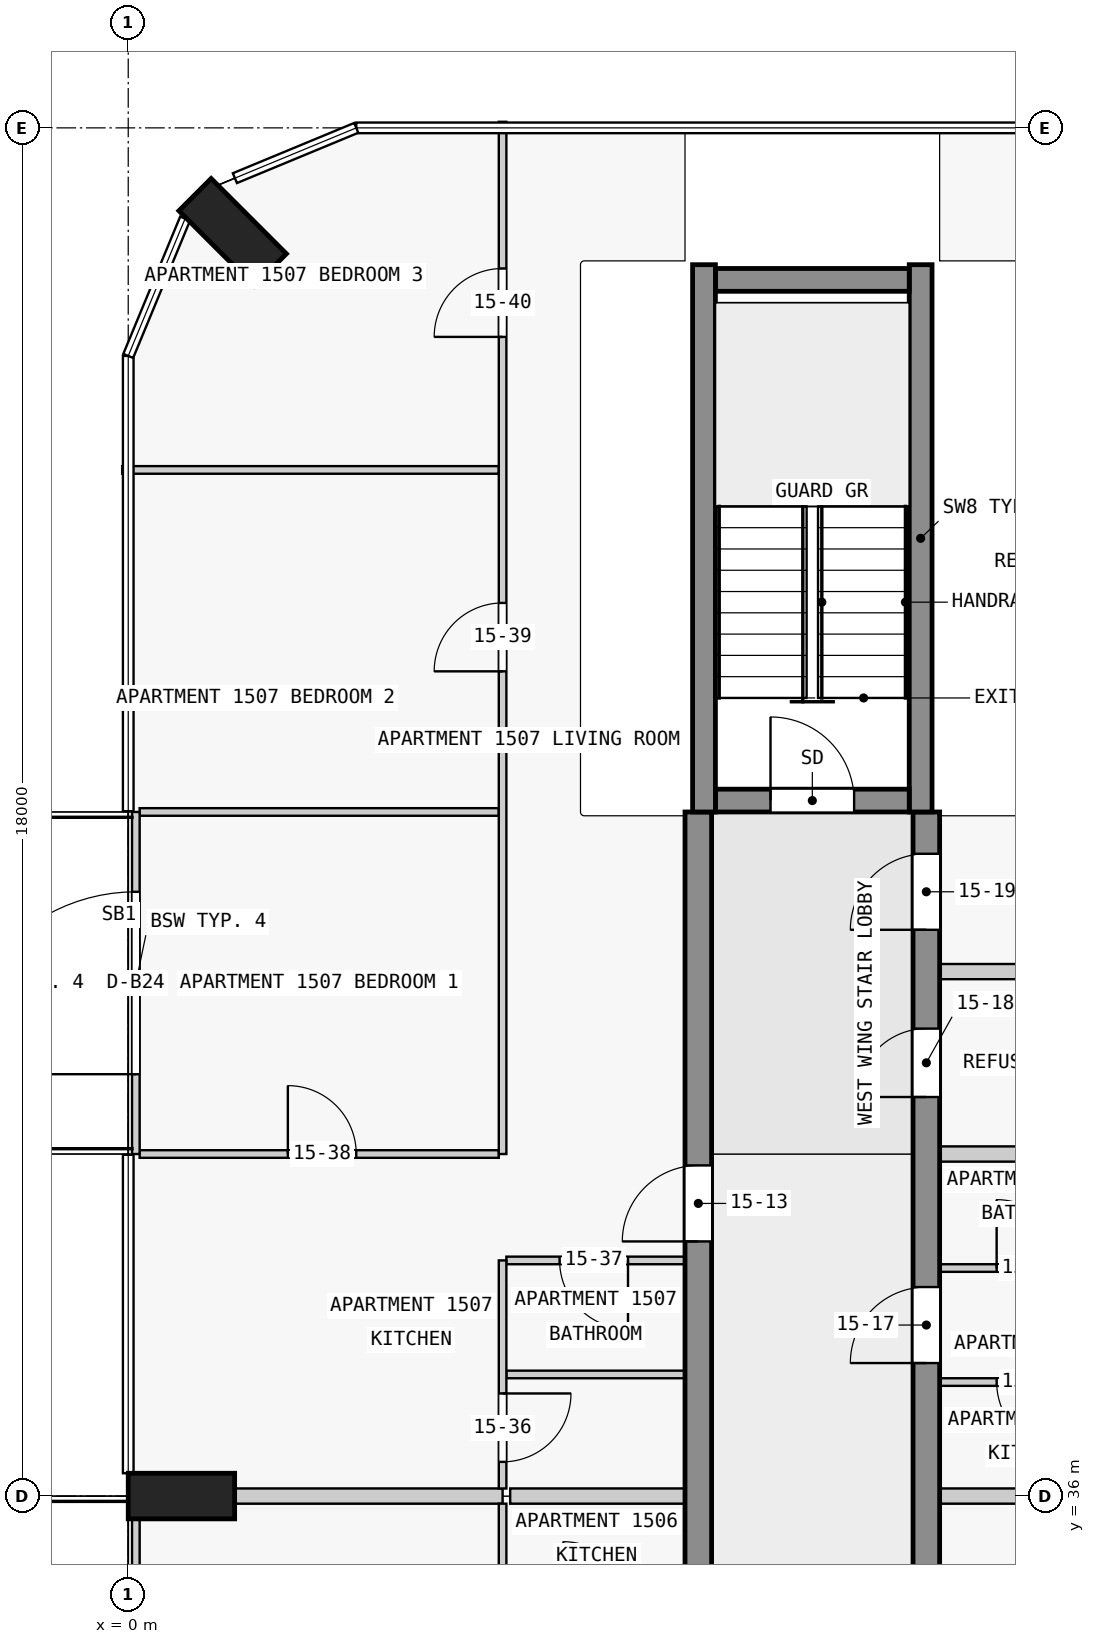
"""IFC4 building model, lengths in metres.
Left out: names, types, materials, properties, quantities, classifications, styles, units other than length and angle.
Written with IfcOpenShell. Run it as: python <this file> out.ifc"""

import sys

from ifc_helpers import new_model, si_unit, direction, frame, frame_2d, origin, origin_2d, place, context, subcontext, project, spatial, rectangle, extrude, element, fill, save


model = new_model("IFC4")
c1 = context("Model", 3, precision=1e-05, world=origin(), true_north=direction((0.0, 1.0)))
c2 = subcontext(c1, "Body", "Model", "MODEL_VIEW")
j1 = project(units=[si_unit("LENGTHUNIT", "METRE"), si_unit("PLANEANGLEUNIT", "RADIAN")], contexts=[c1])
p1 = place(None, origin())
s1 = spatial("IfcSite", under=j1, at=p1, CompositionType="ELEMENT")
p2 = place(p1, origin())
s2 = spatial("IfcBuilding", under=s1, at=p2, CompositionType="ELEMENT")
p3 = place(p2, frame((0.0, 0.0, 61.8)))
s3 = spatial("IfcBuildingStorey", under=s2, at=p3, CompositionType="ELEMENT", Elevation=61.8)
for number, where, z_axis, x_axis in (
    (1, (1.374, 52.626, 0.0), (0.0, 0.0, 1.0), (0.707, 0.707, 0.0)),
    (2, (0.7, 36.0, 0.0), (0.0, 0.0, 1.0), (0.0, 1.0, 0.0)),
):
    element("IfcColumn", number, at=place(p3, frame(where, z_axis=z_axis, x_axis=x_axis)), inside=s3, PredefinedType="COLUMN", context=c2, shape_type="SweptSolid", body=[
        extrude(rectangle(XDim=0.6, YDim=1.4, at=origin_2d()), origin(), (0.0, 0.0, 1.0), 3.5),
    ])
p4 = place(p3, frame((7.725, 45.15, 0.0), z_axis=(0.0, 0.0, 1.0), x_axis=(1.0, 0.0, 0.0)))
e3 = element("IfcWall", 3, at=p4, inside=s3, PredefinedType="SHEAR", context=c2, shape_type="SweptSolid", body=[
    extrude(rectangle(XDim=2.55, YDim=0.3, at=frame_2d((1.275, 0.0))), origin(), (0.0, 0.0, 1.0), 3.5),
])
p5 = place(p4, frame((0.725, 0.0, 0.0)))
e4 = element("IfcOpeningElement", 4, at=p5, cuts=e3, PredefinedType="OPENING", context=c2, shape_type="SweptSolid", body=[
    extrude(rectangle(XDim=1.1, YDim=2.1, at=frame_2d((0.55, 1.05))), frame((0.0, 0.16, 0.0), z_axis=(0.0, -1.0, 0.0), x_axis=(1.0, 0.0, 0.0)), (0.0, 0.0, 1.0), 0.32),
])
p6 = place(p3, frame((7.725, 52.0, 0.0), z_axis=(0.0, 0.0, 1.0), x_axis=(1.0, 0.0, 0.0)))
e5 = element("IfcWall", 5, at=p6, inside=s3, PredefinedType="SHEAR", context=c2, shape_type="SweptSolid", body=[
    extrude(rectangle(XDim=2.55, YDim=0.3, at=frame_2d((1.275, 0.0))), origin(), (0.0, 0.0, 1.0), 3.5),
])
for number, where, z_axis, x_axis in (
    (6, (7.575, 45.0, 0.0), (0.0, 0.0, 1.0), (0.0, 1.0, 0.0)),
    (7, (10.425, 45.0, 0.0), (0.0, 0.0, 1.0), (0.0, 1.0, 0.0)),
):
    element("IfcWall", number, at=place(p3, frame(where, z_axis=z_axis, x_axis=x_axis)), inside=s3, PredefinedType="SHEAR", context=c2, shape_type="SweptSolid", body=[
        extrude(rectangle(XDim=7.2, YDim=0.3, at=frame_2d((3.6, 0.0))), origin(), (0.0, 0.0, 1.0), 3.5),
    ])
p7 = place(p3, frame((7.5, 18.0, 0.0), z_axis=(0.0, 0.0, 1.0), x_axis=(0.0, 1.0, 0.0)))
e8 = element("IfcWall", 8, at=p7, inside=s3, PredefinedType="SHEAR", context=c2, shape_type="SweptSolid", body=[
    extrude(rectangle(XDim=27.0, YDim=0.35, at=frame_2d((13.5, 0.0))), origin(), (0.0, 0.0, 1.0), 3.25),
])
p8 = place(p7, frame((1.75, 0.0, 0.0)))
e9 = element("IfcOpeningElement", 9, at=p8, cuts=e8, PredefinedType="OPENING", context=c2, shape_type="SweptSolid", body=[
    extrude(rectangle(XDim=1.0, YDim=2.1, at=frame_2d((0.5, 1.05))), frame((0.0, 0.185, 0.0), z_axis=(0.0, -1.0, 0.0), x_axis=(1.0, 0.0, 0.0)), (0.0, 0.0, 1.0), 0.37),
])
p9 = place(p7, frame((8.55, 0.0, 0.0)))
e10 = element("IfcOpeningElement", 10, at=p9, cuts=e8, PredefinedType="OPENING", context=c2, shape_type="SweptSolid", body=[
    extrude(rectangle(XDim=1.0, YDim=2.1, at=frame_2d((0.5, 1.05))), frame((0.0, 0.185, 0.0), z_axis=(0.0, -1.0, 0.0), x_axis=(1.0, 0.0, 0.0)), (0.0, 0.0, 1.0), 0.37),
])
p10 = place(p7, frame((15.25, 0.0, 0.0)))
e11 = element("IfcOpeningElement", 11, at=p10, cuts=e8, PredefinedType="OPENING", context=c2, shape_type="SweptSolid", body=[
    extrude(rectangle(XDim=1.0, YDim=2.1, at=frame_2d((0.5, 1.05))), frame((0.0, 0.185, 0.0), z_axis=(0.0, -1.0, 0.0), x_axis=(1.0, 0.0, 0.0)), (0.0, 0.0, 1.0), 0.37),
])
p11 = place(p7, frame((21.35, 0.0, 0.0)))
e12 = element("IfcOpeningElement", 12, at=p11, cuts=e8, PredefinedType="OPENING", context=c2, shape_type="SweptSolid", body=[
    extrude(rectangle(XDim=1.0, YDim=2.1, at=frame_2d((0.5, 1.05))), frame((0.0, 0.185, 0.0), z_axis=(0.0, -1.0, 0.0), x_axis=(1.0, 0.0, 0.0)), (0.0, 0.0, 1.0), 0.37),
])
p12 = place(p3, frame((10.5, 18.0, 0.0), z_axis=(0.0, 0.0, 1.0), x_axis=(0.0, 1.0, 0.0)))
e13 = element("IfcWall", 13, at=p12, inside=s3, PredefinedType="SHEAR", context=c2, shape_type="SweptSolid", body=[
    extrude(rectangle(XDim=27.0, YDim=0.35, at=frame_2d((13.5, 0.0))), origin(), (0.0, 0.0, 1.0), 3.25),
])
p13 = place(p12, frame((4.05, 0.0, 0.0)))
e14 = element("IfcOpeningElement", 14, at=p13, cuts=e13, PredefinedType="OPENING", context=c2, shape_type="SweptSolid", body=[
    extrude(rectangle(XDim=1.0, YDim=2.1, at=frame_2d((0.5, 1.05))), frame((0.0, 0.185, 0.0), z_axis=(0.0, -1.0, 0.0), x_axis=(1.0, 0.0, 0.0)), (0.0, 0.0, 1.0), 0.37),
])
p14 = place(p12, frame((10.75, 0.0, 0.0)))
e15 = element("IfcOpeningElement", 15, at=p14, cuts=e13, PredefinedType="OPENING", context=c2, shape_type="SweptSolid", body=[
    extrude(rectangle(XDim=1.0, YDim=2.1, at=frame_2d((0.5, 1.05))), frame((0.0, 0.185, 0.0), z_axis=(0.0, -1.0, 0.0), x_axis=(1.0, 0.0, 0.0)), (0.0, 0.0, 1.0), 0.37),
])
p15 = place(p12, frame((15.25, 0.0, 0.0)))
e16 = element("IfcOpeningElement", 16, at=p15, cuts=e13, PredefinedType="OPENING", context=c2, shape_type="SweptSolid", body=[
    extrude(rectangle(XDim=1.0, YDim=2.1, at=frame_2d((0.5, 1.05))), frame((0.0, 0.185, 0.0), z_axis=(0.0, -1.0, 0.0), x_axis=(1.0, 0.0, 0.0)), (0.0, 0.0, 1.0), 0.37),
])
p16 = place(p12, frame((19.75, 0.0, 0.0)))
e17 = element("IfcOpeningElement", 17, at=p16, cuts=e13, PredefinedType="OPENING", context=c2, shape_type="SweptSolid", body=[
    extrude(rectangle(XDim=1.0, YDim=2.1, at=frame_2d((0.5, 1.05))), frame((0.0, 0.185, 0.0), z_axis=(0.0, -1.0, 0.0), x_axis=(1.0, 0.0, 0.0)), (0.0, 0.0, 1.0), 0.37),
])
p17 = place(p12, frame((23.25, 0.0, 0.0)))
e18 = element("IfcOpeningElement", 18, at=p17, cuts=e13, PredefinedType="OPENING", context=c2, shape_type="SweptSolid", body=[
    extrude(rectangle(XDim=0.9, YDim=2.1, at=frame_2d((0.45, 1.05))), frame((0.0, 0.185, 0.0), z_axis=(0.0, -1.0, 0.0), x_axis=(1.0, 0.0, 0.0)), (0.0, 0.0, 1.0), 0.37),
])
p18 = place(p12, frame((25.45, 0.0, 0.0)))
e19 = element("IfcOpeningElement", 19, at=p18, cuts=e13, PredefinedType="OPENING", context=c2, shape_type="SweptSolid", body=[
    extrude(rectangle(XDim=1.0, YDim=2.1, at=frame_2d((0.5, 1.05))), frame((0.0, 0.185, 0.0), z_axis=(0.0, -1.0, 0.0), x_axis=(1.0, 0.0, 0.0)), (0.0, 0.0, 1.0), 0.37),
])
p19 = place(p3, frame((0.1, 31.5, 0.0), z_axis=(0.0, 0.0, 1.0), x_axis=(0.0, 1.0, 0.0)))
e20 = element("IfcWall", 20, at=p19, inside=s3, PredefinedType="STANDARD", context=c2, shape_type="SweptSolid", body=[
    extrude(rectangle(XDim=4.5, YDim=0.1, at=frame_2d((2.25, 0.0))), origin(), (0.0, 0.0, 1.0), 3.25),
])
p20 = place(p19, frame((1.05, 0.0, 0.0)))
e21 = element("IfcOpeningElement", 21, at=p20, cuts=e20, PredefinedType="OPENING", context=c2, shape_type="SweptSolid", body=[
    extrude(rectangle(XDim=2.4, YDim=2.4, at=frame_2d((1.2, 1.2))), frame((0.0, 0.06, 0.0), z_axis=(0.0, -1.0, 0.0), x_axis=(1.0, 0.0, 0.0)), (0.0, 0.0, 1.0), 0.12),
])
p21 = place(p3, frame((0.1, 40.5, 0.0), z_axis=(0.0, 0.0, 1.0), x_axis=(0.0, 1.0, 0.0)))
e22 = element("IfcWall", 22, at=p21, inside=s3, PredefinedType="STANDARD", context=c2, shape_type="SweptSolid", body=[
    extrude(rectangle(XDim=4.5, YDim=0.1, at=frame_2d((2.25, 0.0))), origin(), (0.0, 0.0, 1.0), 3.25),
])
p22 = place(p21, frame((1.05, 0.0, 0.0)))
e23 = element("IfcOpeningElement", 23, at=p22, cuts=e22, PredefinedType="OPENING", context=c2, shape_type="SweptSolid", body=[
    extrude(rectangle(XDim=2.4, YDim=2.4, at=frame_2d((1.2, 1.2))), frame((0.0, 0.06, 0.0), z_axis=(0.0, -1.0, 0.0), x_axis=(1.0, 0.0, 0.0)), (0.0, 0.0, 1.0), 0.12),
])
p23 = place(p3, frame((7.325, 36.0, 0.0), z_axis=(0.0, 0.0, 1.0), x_axis=(-1.0, 0.0, 0.0)))
e24 = element("IfcWall", 24, at=p23, inside=s3, PredefinedType="PARTITIONING", context=c2, shape_type="SweptSolid", body=[
    extrude(rectangle(XDim=2.3, YDim=0.2, at=frame_2d((1.15, 0.0))), origin(), (0.0, 0.0, 1.0), 3.25),
])
p24 = place(p3, frame((16.6, 36.0, 0.0), z_axis=(0.0, 0.0, 1.0), x_axis=(-1.0, 0.0, 0.0)))
e25 = element("IfcWall", 25, at=p24, inside=s3, PredefinedType="PARTITIONING", context=c2, shape_type="SweptSolid", body=[
    extrude(rectangle(XDim=5.925, YDim=0.2, at=frame_2d((2.962, 0.0))), origin(), (0.0, 0.0, 1.0), 3.25),
])
p25 = place(p3, frame((1.4, 36.0, 0.0), z_axis=(0.0, 0.0, 1.0), x_axis=(1.0, 0.0, 0.0)))
e26 = element("IfcWall", 26, at=p25, inside=s3, PredefinedType="PARTITIONING", context=c2, shape_type="SweptSolid", body=[
    extrude(rectangle(XDim=3.525, YDim=0.2, at=frame_2d((1.763, 0.0))), origin(), (0.0, 0.0, 1.0), 3.25),
])
p26 = place(p3, frame((13.075, 37.5, 0.0), z_axis=(0.0, 0.0, 1.0), x_axis=(-1.0, 0.0, 0.0)))
e27 = element("IfcWall", 27, at=p26, inside=s3, PredefinedType="PARTITIONING", context=c2, shape_type="SweptSolid", body=[
    extrude(rectangle(XDim=2.4, YDim=0.1, at=frame_2d((1.2, 0.0))), origin(), (0.0, 0.0, 1.0), 3.25),
])
p27 = place(p26, frame((0.75, 0.0, 0.0)))
e28 = element("IfcOpeningElement", 28, at=p27, cuts=e27, PredefinedType="OPENING", context=c2, shape_type="SweptSolid", body=[
    extrude(rectangle(XDim=0.9, YDim=2.1, at=frame_2d((0.45, 1.05))), frame((0.0, 0.06, 0.0), z_axis=(0.0, -1.0, 0.0), x_axis=(1.0, 0.0, 0.0)), (0.0, 0.0, 1.0), 0.12),
])
p28 = place(p3, frame((7.325, 37.6, 0.0), z_axis=(0.0, 0.0, 1.0), x_axis=(-1.0, 0.0, 0.0)))
e29 = element("IfcWall", 29, at=p28, inside=s3, PredefinedType="PARTITIONING", context=c2, shape_type="SweptSolid", body=[
    extrude(rectangle(XDim=2.35, YDim=0.1, at=frame_2d((1.175, 0.0))), origin(), (0.0, 0.0, 1.0), 3.25),
])
p29 = place(p3, frame((10.675, 39.0, 0.0), z_axis=(0.0, 0.0, 1.0), x_axis=(1.0, 0.0, 0.0)))
e30 = element("IfcWall", 30, at=p29, inside=s3, PredefinedType="PARTITIONING", context=c2, shape_type="SweptSolid", body=[
    extrude(rectangle(XDim=2.4, YDim=0.1, at=frame_2d((1.2, 0.0))), origin(), (0.0, 0.0, 1.0), 3.25),
])
p30 = place(p29, frame((0.75, 0.0, 0.0)))
e31 = element("IfcOpeningElement", 31, at=p30, cuts=e30, PredefinedType="OPENING", context=c2, shape_type="SweptSolid", body=[
    extrude(rectangle(XDim=0.9, YDim=2.1, at=frame_2d((0.45, 1.05))), frame((0.0, 0.06, 0.0), z_axis=(0.0, -1.0, 0.0), x_axis=(1.0, 0.0, 0.0)), (0.0, 0.0, 1.0), 0.12),
])
p31 = place(p3, frame((7.325, 39.1, 0.0), z_axis=(0.0, 0.0, 1.0), x_axis=(-1.0, 0.0, 0.0)))
e32 = element("IfcWall", 32, at=p31, inside=s3, PredefinedType="PARTITIONING", context=c2, shape_type="SweptSolid", body=[
    extrude(rectangle(XDim=2.35, YDim=0.1, at=frame_2d((1.175, 0.0))), origin(), (0.0, 0.0, 1.0), 3.25),
])
p32 = place(p31, frame((0.75, 0.0, 0.0)))
e33 = element("IfcOpeningElement", 33, at=p32, cuts=e32, PredefinedType="OPENING", context=c2, shape_type="SweptSolid", body=[
    extrude(rectangle(XDim=0.9, YDim=2.1, at=frame_2d((0.45, 1.05))), frame((0.0, 0.06, 0.0), z_axis=(0.0, -1.0, 0.0), x_axis=(1.0, 0.0, 0.0)), (0.0, 0.0, 1.0), 0.12),
])
p33 = place(p3, frame((0.15, 40.5, 0.0), z_axis=(0.0, 0.0, 1.0), x_axis=(1.0, 0.0, 0.0)))
e34 = element("IfcWall", 34, at=p33, inside=s3, PredefinedType="PARTITIONING", context=c2, shape_type="SweptSolid", body=[
    extrude(rectangle(XDim=4.725, YDim=0.1, at=frame_2d((2.363, 0.0))), origin(), (0.0, 0.0, 1.0), 3.25),
])
p34 = place(p33, frame((1.95, 0.0, 0.0)))
e35 = element("IfcOpeningElement", 35, at=p34, cuts=e34, PredefinedType="OPENING", context=c2, shape_type="SweptSolid", body=[
    extrude(rectangle(XDim=0.9, YDim=2.1, at=frame_2d((0.45, 1.05))), frame((0.0, 0.06, 0.0), z_axis=(0.0, -1.0, 0.0), x_axis=(1.0, 0.0, 0.0)), (0.0, 0.0, 1.0), 0.12),
])
p35 = place(p3, frame((12.975, 40.5, 0.0), z_axis=(0.0, 0.0, 1.0), x_axis=(-1.0, 0.0, 0.0)))
e36 = element("IfcWall", 36, at=p35, inside=s3, PredefinedType="PARTITIONING", context=c2, shape_type="SweptSolid", body=[
    extrude(rectangle(XDim=2.3, YDim=0.2, at=frame_2d((1.15, 0.0))), origin(), (0.0, 0.0, 1.0), 3.25),
])
p36 = place(p3, frame((13.075, 42.9, 0.0), z_axis=(0.0, 0.0, 1.0), x_axis=(-1.0, 0.0, 0.0)))
e37 = element("IfcWall", 37, at=p36, inside=s3, PredefinedType="PARTITIONING", context=c2, shape_type="SweptSolid", body=[
    extrude(rectangle(XDim=2.4, YDim=0.2, at=frame_2d((1.2, 0.0))), origin(), (0.0, 0.0, 1.0), 3.25),
])
p37 = place(p3, frame((4.875, 45.0, 0.0), z_axis=(0.0, 0.0, 1.0), x_axis=(-1.0, 0.0, 0.0)))
e38 = element("IfcWall", 38, at=p37, inside=s3, PredefinedType="PARTITIONING", context=c2, shape_type="SweptSolid", body=[
    extrude(rectangle(XDim=4.725, YDim=0.1, at=frame_2d((2.363, 0.0))), origin(), (0.0, 0.0, 1.0), 3.25),
])
p38 = place(p3, frame((4.875, 49.5, 0.0), z_axis=(0.0, 0.0, 1.0), x_axis=(-1.0, 0.0, 0.0)))
e39 = element("IfcWall", 39, at=p38, inside=s3, PredefinedType="PARTITIONING", context=c2, shape_type="SweptSolid", body=[
    extrude(rectangle(XDim=4.955, YDim=0.1, at=frame_2d((2.478, 0.0))), origin(), (0.0, 0.0, 1.0), 3.25),
])
p39 = place(p3, frame((4.925, 35.9, 0.0), z_axis=(0.0, 0.0, 1.0), x_axis=(0.0, -1.0, 0.0)))
e40 = element("IfcWall", 40, at=p39, inside=s3, PredefinedType="PARTITIONING", context=c2, shape_type="SweptSolid", body=[
    extrude(rectangle(XDim=1.4, YDim=0.1, at=frame_2d((0.7, 0.0))), origin(), (0.0, 0.0, 1.0), 3.25),
])
p40 = place(p3, frame((4.925, 39.1, 0.0), z_axis=(0.0, 0.0, 1.0), x_axis=(0.0, -1.0, 0.0)))
e41 = element("IfcWall", 41, at=p40, inside=s3, PredefinedType="PARTITIONING", context=c2, shape_type="SweptSolid", body=[
    extrude(rectangle(XDim=3.0, YDim=0.1, at=frame_2d((1.5, 0.0))), origin(), (0.0, 0.0, 1.0), 3.25),
])
p41 = place(p40, frame((1.75, 0.0, 0.0)))
e42 = element("IfcOpeningElement", 42, at=p41, cuts=e41, PredefinedType="OPENING", context=c2, shape_type="SweptSolid", body=[
    extrude(rectangle(XDim=0.9, YDim=2.1, at=frame_2d((0.45, 1.05))), frame((0.0, 0.06, 0.0), z_axis=(0.0, -1.0, 0.0), x_axis=(1.0, 0.0, 0.0)), (0.0, 0.0, 1.0), 0.12),
])
p42 = place(p3, frame((4.925, 40.5, 0.0), z_axis=(0.0, 0.0, 1.0), x_axis=(0.0, 1.0, 0.0)))
e43 = element("IfcWall", 43, at=p42, inside=s3, PredefinedType="PARTITIONING", context=c2, shape_type="SweptSolid", body=[
    extrude(rectangle(XDim=13.58, YDim=0.1, at=frame_2d((6.79, 0.0))), origin(), (0.0, 0.0, 1.0), 3.25),
])
p43 = place(p42, frame((6.35, 0.0, 0.0)))
e44 = element("IfcOpeningElement", 44, at=p43, cuts=e43, PredefinedType="OPENING", context=c2, shape_type="SweptSolid", body=[
    extrude(rectangle(XDim=0.9, YDim=2.1, at=frame_2d((0.45, 1.05))), frame((0.0, 0.06, 0.0), z_axis=(0.0, -1.0, 0.0), x_axis=(1.0, 0.0, 0.0)), (0.0, 0.0, 1.0), 0.12),
])
p44 = place(p42, frame((10.75, 0.0, 0.0)))
e45 = element("IfcOpeningElement", 45, at=p44, cuts=e43, PredefinedType="OPENING", context=c2, shape_type="SweptSolid", body=[
    extrude(rectangle(XDim=0.9, YDim=2.1, at=frame_2d((0.45, 1.05))), frame((0.0, 0.06, 0.0), z_axis=(0.0, -1.0, 0.0), x_axis=(1.0, 0.0, 0.0)), (0.0, 0.0, 1.0), 0.12),
])
p45 = place(p22, origin())
e46 = element("IfcDoor", 46, at=p45, inside=s3, OperationType="SINGLE_SWING_LEFT", PredefinedType="DOOR", context=c2, shape_type="SweptSolid", body=[
    extrude(rectangle(XDim=2.4, YDim=2.4, at=frame_2d((1.2, 1.2))), frame((0.0, 0.025, 0.0), z_axis=(0.0, -1.0, 0.0), x_axis=(1.0, 0.0, 0.0)), (0.0, 0.0, 1.0), 0.05),
])
fill(e23, e46)
p46 = place(p5, origin())
e47 = element("IfcDoor", 47, at=p46, inside=s3, OperationType="SINGLE_SWING_LEFT", PredefinedType="DOOR", context=c2, shape_type="SweptSolid", body=[
    extrude(rectangle(XDim=1.1, YDim=2.1, at=frame_2d((0.55, 1.05))), frame((0.0, 0.025, 0.0), z_axis=(0.0, -1.0, 0.0), x_axis=(1.0, 0.0, 0.0)), (0.0, 0.0, 1.0), 0.05),
])
fill(e4, e47)
p47 = place(p11, origin())
e48 = element("IfcDoor", 48, at=p47, inside=s3, OperationType="SINGLE_SWING_RIGHT", PredefinedType="DOOR", context=c2, shape_type="SweptSolid", body=[
    extrude(rectangle(XDim=1.0, YDim=2.1, at=frame_2d((0.5, 1.05))), frame((0.0, 0.025, 0.0), z_axis=(0.0, -1.0, 0.0), x_axis=(1.0, 0.0, 0.0)), (0.0, 0.0, 1.0), 0.05),
])
fill(e12, e48)
p48 = place(p16, origin())
e49 = element("IfcDoor", 49, at=p48, inside=s3, OperationType="SINGLE_SWING_RIGHT", PredefinedType="DOOR", context=c2, shape_type="SweptSolid", body=[
    extrude(rectangle(XDim=1.0, YDim=2.1, at=frame_2d((0.5, 1.05))), frame((0.0, 0.025, 0.0), z_axis=(0.0, -1.0, 0.0), x_axis=(1.0, 0.0, 0.0)), (0.0, 0.0, 1.0), 0.05),
])
fill(e17, e49)
p49 = place(p17, origin())
e50 = element("IfcDoor", 50, at=p49, inside=s3, OperationType="SINGLE_SWING_RIGHT", PredefinedType="DOOR", context=c2, shape_type="SweptSolid", body=[
    extrude(rectangle(XDim=0.9, YDim=2.1, at=frame_2d((0.45, 1.05))), frame((0.0, 0.025, 0.0), z_axis=(0.0, -1.0, 0.0), x_axis=(1.0, 0.0, 0.0)), (0.0, 0.0, 1.0), 0.05),
])
fill(e18, e50)
p50 = place(p18, origin())
e51 = element("IfcDoor", 51, at=p50, inside=s3, OperationType="SINGLE_SWING_RIGHT", PredefinedType="DOOR", context=c2, shape_type="SweptSolid", body=[
    extrude(rectangle(XDim=1.0, YDim=2.1, at=frame_2d((0.5, 1.05))), frame((0.0, 0.025, 0.0), z_axis=(0.0, -1.0, 0.0), x_axis=(1.0, 0.0, 0.0)), (0.0, 0.0, 1.0), 0.05),
])
fill(e19, e51)
p51 = place(p41, origin())
e52 = element("IfcDoor", 52, at=p51, inside=s3, OperationType="SINGLE_SWING_RIGHT", PredefinedType="DOOR", context=c2, shape_type="SweptSolid", body=[
    extrude(rectangle(XDim=0.9, YDim=2.1, at=frame_2d((0.45, 1.05))), frame((0.0, 0.025, 0.0), z_axis=(0.0, -1.0, 0.0), x_axis=(1.0, 0.0, 0.0)), (0.0, 0.0, 1.0), 0.05),
])
fill(e42, e52)
p52 = place(p32, origin())
e53 = element("IfcDoor", 53, at=p52, inside=s3, OperationType="SINGLE_SWING_RIGHT", PredefinedType="DOOR", context=c2, shape_type="SweptSolid", body=[
    extrude(rectangle(XDim=0.9, YDim=2.1, at=frame_2d((0.45, 1.05))), frame((0.0, 0.025, 0.0), z_axis=(0.0, -1.0, 0.0), x_axis=(1.0, 0.0, 0.0)), (0.0, 0.0, 1.0), 0.05),
])
fill(e33, e53)
p53 = place(p34, origin())
e54 = element("IfcDoor", 54, at=p53, inside=s3, OperationType="SINGLE_SWING_RIGHT", PredefinedType="DOOR", context=c2, shape_type="SweptSolid", body=[
    extrude(rectangle(XDim=0.9, YDim=2.1, at=frame_2d((0.45, 1.05))), frame((0.0, 0.025, 0.0), z_axis=(0.0, -1.0, 0.0), x_axis=(1.0, 0.0, 0.0)), (0.0, 0.0, 1.0), 0.05),
])
fill(e35, e54)
p54 = place(p43, origin())
e55 = element("IfcDoor", 55, at=p54, inside=s3, OperationType="SINGLE_SWING_RIGHT", PredefinedType="DOOR", context=c2, shape_type="SweptSolid", body=[
    extrude(rectangle(XDim=0.9, YDim=2.1, at=frame_2d((0.45, 1.05))), frame((0.0, 0.025, 0.0), z_axis=(0.0, -1.0, 0.0), x_axis=(1.0, 0.0, 0.0)), (0.0, 0.0, 1.0), 0.05),
])
fill(e44, e55)
p55 = place(p44, origin())
e56 = element("IfcDoor", 56, at=p55, inside=s3, OperationType="SINGLE_SWING_RIGHT", PredefinedType="DOOR", context=c2, shape_type="SweptSolid", body=[
    extrude(rectangle(XDim=0.9, YDim=2.1, at=frame_2d((0.45, 1.05))), frame((0.0, 0.025, 0.0), z_axis=(0.0, -1.0, 0.0), x_axis=(1.0, 0.0, 0.0)), (0.0, 0.0, 1.0), 0.05),
])
fill(e45, e56)
p56 = place(p27, origin())
e57 = element("IfcDoor", 57, at=p56, inside=s3, OperationType="SINGLE_SWING_RIGHT", PredefinedType="DOOR", context=c2, shape_type="SweptSolid", body=[
    extrude(rectangle(XDim=0.9, YDim=2.1, at=frame_2d((0.45, 1.05))), frame((0.0, 0.025, 0.0), z_axis=(0.0, -1.0, 0.0), x_axis=(1.0, 0.0, 0.0)), (0.0, 0.0, 1.0), 0.05),
])
fill(e28, e57)
p57 = place(p30, origin())
e58 = element("IfcDoor", 58, at=p57, inside=s3, OperationType="SINGLE_SWING_RIGHT", PredefinedType="DOOR", context=c2, shape_type="SweptSolid", body=[
    extrude(rectangle(XDim=0.9, YDim=2.1, at=frame_2d((0.45, 1.05))), frame((0.0, 0.025, 0.0), z_axis=(0.0, -1.0, 0.0), x_axis=(1.0, 0.0, 0.0)), (0.0, 0.0, 1.0), 0.05),
])
fill(e31, e58)
save(model, sys.argv[1])
